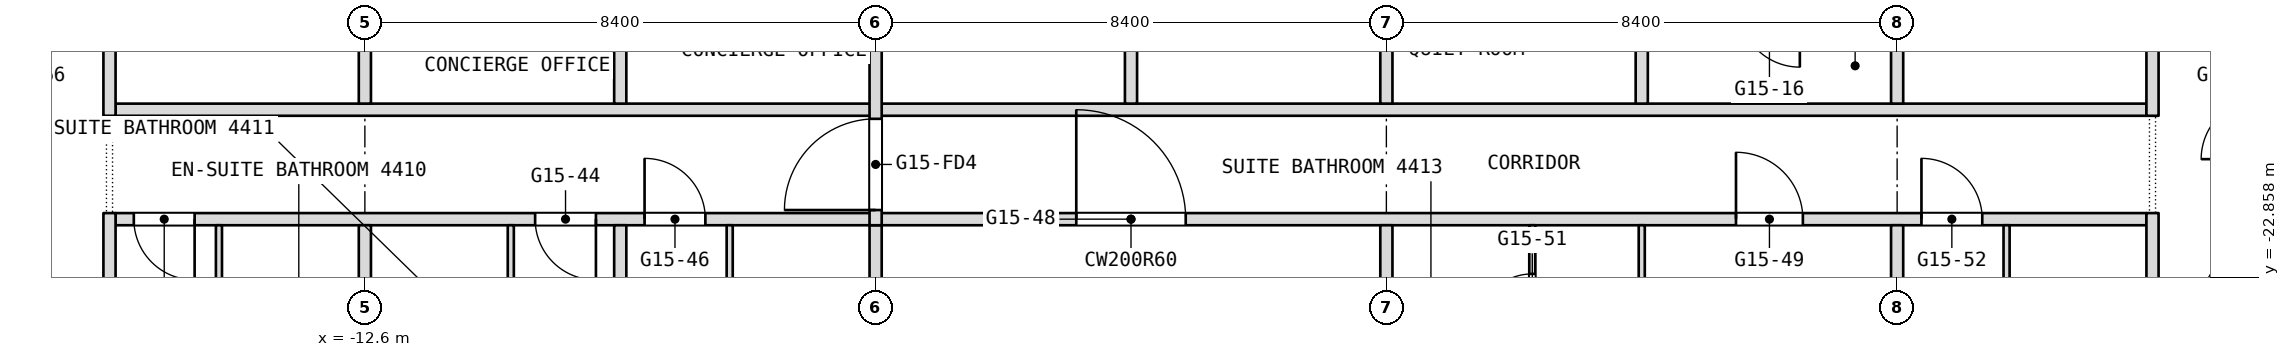
"""IFC4 building model, lengths in metres.
Left out: names, types, materials, properties, quantities, classifications, styles, units other than length and angle.
Written with IfcOpenShell. Run it as: python <this file> out.ifc"""

import sys

from ifc_helpers import new_model, si_unit, direction, frame, frame_2d, origin, place, context, subcontext, project, spatial, rectangle, extrude, element, fill, save


model = new_model("IFC4")
c1 = context("Model", 3, precision=1e-05, world=origin(), true_north=direction((0.0, 1.0)))
c2 = subcontext(c1, "Body", "Model", "MODEL_VIEW")
j1 = project(units=[si_unit("LENGTHUNIT", "METRE"), si_unit("PLANEANGLEUNIT", "RADIAN")], contexts=[c1])
p1 = place(None, origin())
s1 = spatial("IfcSite", under=j1, at=p1, CompositionType="ELEMENT")
p2 = place(p1, origin())
s2 = spatial("IfcBuilding", under=s1, at=p2, CompositionType="ELEMENT")
p3 = place(p2, frame((0.0, 0.0, 194.9)))
s3 = spatial("IfcBuildingStorey", under=s2, at=p3, CompositionType="ELEMENT", Elevation=194.9)
p4 = place(p3, frame((-16.7, -21.9, 0.0), z_axis=(0.0, 0.0, 1.0), x_axis=(1.0, 0.0, 0.0)))
e1 = element("IfcWall", 1, at=p4, inside=s3, PredefinedType="PARTITIONING", context=c2, shape_type="SweptSolid", body=[
    extrude(rectangle(XDim=33.4, YDim=0.2, at=frame_2d((16.7, 0.0))), origin(), (0.0, 0.0, 1.0), 3.34),
])
p5 = place(p4, frame((0.3, 0.0, 0.0)))
e2 = element("IfcOpeningElement", 2, at=p5, cuts=e1, PredefinedType="OPENING", context=c2, shape_type="SweptSolid", body=[
    extrude(rectangle(XDim=1.0, YDim=2.1, at=frame_2d((0.5, 1.05))), frame((0.0, 0.1, 0.0), z_axis=(0.0, -1.0, 0.0), x_axis=(1.0, 0.0, 0.0)), (0.0, 0.0, 1.0), 0.2),
])
p6 = place(p4, frame((6.9, 0.0, 0.0)))
e3 = element("IfcOpeningElement", 3, at=p6, cuts=e1, PredefinedType="OPENING", context=c2, shape_type="SweptSolid", body=[
    extrude(rectangle(XDim=1.0, YDim=2.1, at=frame_2d((0.5, 1.05))), frame((0.0, 0.1, 0.0), z_axis=(0.0, -1.0, 0.0), x_axis=(1.0, 0.0, 0.0)), (0.0, 0.0, 1.0), 0.2),
])
p7 = place(p4, frame((8.7, 0.0, 0.0)))
e4 = element("IfcOpeningElement", 4, at=p7, cuts=e1, PredefinedType="OPENING", context=c2, shape_type="SweptSolid", body=[
    extrude(rectangle(XDim=1.0, YDim=2.1, at=frame_2d((0.5, 1.05))), frame((0.0, 0.1, 0.0), z_axis=(0.0, -1.0, 0.0), x_axis=(1.0, 0.0, 0.0)), (0.0, 0.0, 1.0), 0.2),
])
p8 = place(p4, frame((15.8, 0.0, 0.0)))
e5 = element("IfcOpeningElement", 5, at=p8, cuts=e1, PredefinedType="OPENING", context=c2, shape_type="SweptSolid", body=[
    extrude(rectangle(XDim=1.8, YDim=2.1, at=frame_2d((0.9, 1.05))), frame((0.0, 0.1, 0.0), z_axis=(0.0, -1.0, 0.0), x_axis=(1.0, 0.0, 0.0)), (0.0, 0.0, 1.0), 0.2),
])
p9 = place(p4, frame((26.65, 0.0, 0.0)))
e6 = element("IfcOpeningElement", 6, at=p9, cuts=e1, PredefinedType="OPENING", context=c2, shape_type="SweptSolid", body=[
    extrude(rectangle(XDim=1.1, YDim=2.1, at=frame_2d((0.55, 1.05))), frame((0.0, 0.1, 0.0), z_axis=(0.0, -1.0, 0.0), x_axis=(1.0, 0.0, 0.0)), (0.0, 0.0, 1.0), 0.2),
])
p10 = place(p4, frame((29.7, 0.0, 0.0)))
e7 = element("IfcOpeningElement", 7, at=p10, cuts=e1, PredefinedType="OPENING", context=c2, shape_type="SweptSolid", body=[
    extrude(rectangle(XDim=1.0, YDim=2.1, at=frame_2d((0.5, 1.05))), frame((0.0, 0.1, 0.0), z_axis=(0.0, -1.0, 0.0), x_axis=(1.0, 0.0, 0.0)), (0.0, 0.0, 1.0), 0.2),
])
p11 = place(p3, frame((-16.7, -20.1, 0.0), z_axis=(0.0, 0.0, 1.0), x_axis=(1.0, 0.0, 0.0)))
e8 = element("IfcWall", 8, at=p11, inside=s3, PredefinedType="PARTITIONING", context=c2, shape_type="SweptSolid", body=[
    extrude(rectangle(XDim=33.4, YDim=0.2, at=frame_2d((16.7, 0.0))), origin(), (0.0, 0.0, 1.0), 3.34),
])
p12 = place(p3, frame((16.8, -27.229, 0.0), z_axis=(0.0, 0.0, 1.0), x_axis=(0.0, 1.0, 0.0)))
e9 = element("IfcWall", 9, at=p12, inside=s3, PredefinedType="PARTITIONING", context=c2, shape_type="SweptSolid", body=[
    extrude(rectangle(XDim=5.429, YDim=0.2, at=frame_2d((2.714, 0.0))), origin(), (0.0, 0.0, 1.0), 3.34),
])
p13 = place(p3, frame((16.8, -20.2, 0.0), z_axis=(0.0, 0.0, 1.0), x_axis=(0.0, 1.0, 0.0)))
e10 = element("IfcWall", 10, at=p13, inside=s3, PredefinedType="PARTITIONING", context=c2, shape_type="SweptSolid", body=[
    extrude(rectangle(XDim=6.8, YDim=0.2, at=frame_2d((3.4, 0.0))), origin(), (0.0, 0.0, 1.0), 3.34),
])
p14 = place(p3, frame((14.4, -25.85, 0.0), z_axis=(0.0, 0.0, 1.0), x_axis=(0.0, 1.0, 0.0)))
e11 = element("IfcWall", 11, at=p14, inside=s3, PredefinedType="PARTITIONING", context=c2, shape_type="SweptSolid", body=[
    extrude(rectangle(XDim=3.85, YDim=0.1, at=frame_2d((1.925, 0.0))), origin(), (0.0, 0.0, 1.0), 3.34),
])
p15 = place(p3, frame((12.6, -28.343, 0.0), z_axis=(0.0, 0.0, 1.0), x_axis=(0.0, 1.0, 0.0)))
e12 = element("IfcWall", 12, at=p15, inside=s3, PredefinedType="PARTITIONING", context=c2, shape_type="SweptSolid", body=[
    extrude(rectangle(XDim=6.343, YDim=0.2, at=frame_2d((3.171, 0.0))), origin(), (0.0, 0.0, 1.0), 3.34),
])
p16 = place(p3, frame((12.6, -20.0, 0.0), z_axis=(0.0, 0.0, 1.0), x_axis=(0.0, 1.0, 0.0)))
e13 = element("IfcWall", 13, at=p16, inside=s3, PredefinedType="PARTITIONING", context=c2, shape_type="SweptSolid", body=[
    extrude(rectangle(XDim=1.5, YDim=0.2, at=frame_2d((0.75, 0.0))), origin(), (0.0, 0.0, 1.0), 3.34),
])
p17 = place(p3, frame((8.4, -28.9, 0.0), z_axis=(0.0, 0.0, 1.0), x_axis=(0.0, 1.0, 0.0)))
e14 = element("IfcWall", 14, at=p17, inside=s3, PredefinedType="PARTITIONING", context=c2, shape_type="SweptSolid", body=[
    extrude(rectangle(XDim=6.9, YDim=0.1, at=frame_2d((3.45, 0.0))), origin(), (0.0, 0.0, 1.0), 3.34),
])
p18 = place(p17, frame((2.53, 0.0, 0.0)))
e15 = element("IfcOpeningElement", 15, at=p18, cuts=e14, PredefinedType="OPENING", context=c2, shape_type="SweptSolid", body=[
    extrude(rectangle(XDim=0.9, YDim=2.1, at=frame_2d((0.45, 1.05))), frame((0.0, 0.05, 0.0), z_axis=(0.0, -1.0, 0.0), x_axis=(1.0, 0.0, 0.0)), (0.0, 0.0, 1.0), 0.1),
])
p19 = place(p3, frame((8.4, -20.0, 0.0), z_axis=(0.0, 0.0, 1.0), x_axis=(0.0, 1.0, 0.0)))
e16 = element("IfcWall", 16, at=p19, inside=s3, PredefinedType="PARTITIONING", context=c2, shape_type="SweptSolid", body=[
    extrude(rectangle(XDim=1.5, YDim=0.2, at=frame_2d((0.75, 0.0))), origin(), (0.0, 0.0, 1.0), 3.34),
])
p20 = place(p3, frame((6.6, -24.55, 0.0), z_axis=(0.0, 0.0, 1.0), x_axis=(0.0, 1.0, 0.0)))
e17 = element("IfcWall", 17, at=p20, inside=s3, PredefinedType="PARTITIONING", context=c2, shape_type="SweptSolid", body=[
    extrude(rectangle(XDim=2.55, YDim=0.1, at=frame_2d((1.275, 0.0))), origin(), (0.0, 0.0, 1.0), 3.34),
])
p21 = place(p20, frame((0.85, 0.0, 0.0)))
e18 = element("IfcOpeningElement", 18, at=p21, cuts=e17, PredefinedType="OPENING", context=c2, shape_type="SweptSolid", body=[
    extrude(rectangle(XDim=0.9, YDim=2.1, at=frame_2d((0.45, 1.05))), frame((0.0, 0.05, 0.0), z_axis=(0.0, -1.0, 0.0), x_axis=(1.0, 0.0, 0.0)), (0.0, 0.0, 1.0), 0.1),
])
p22 = place(p3, frame((4.2, -28.9, 0.0), z_axis=(0.0, 0.0, 1.0), x_axis=(0.0, 1.0, 0.0)))
e19 = element("IfcWall", 19, at=p22, inside=s3, PredefinedType="PARTITIONING", context=c2, shape_type="SweptSolid", body=[
    extrude(rectangle(XDim=6.9, YDim=0.2, at=frame_2d((3.45, 0.0))), origin(), (0.0, 0.0, 1.0), 3.34),
])
for number, where, z_axis, x_axis in (
    (20, (4.2, -20.0, 0.0), (0.0, 0.0, 1.0), (0.0, 1.0, 0.0)),
    (21, (0.0, -20.0, 0.0), (0.0, 0.0, 1.0), (0.0, 1.0, 0.0)),
):
    element("IfcWall", number, at=place(p3, frame(where, z_axis=z_axis, x_axis=x_axis)), inside=s3, PredefinedType="PARTITIONING", context=c2, shape_type="SweptSolid", body=[
        extrude(rectangle(XDim=6.4, YDim=0.2, at=frame_2d((3.2, 0.0))), origin(), (0.0, 0.0, 1.0), 3.34),
    ])
p23 = place(p3, frame((-4.2, -28.9, 0.0), z_axis=(0.0, 0.0, 1.0), x_axis=(0.0, 1.0, 0.0)))
e22 = element("IfcWall", 22, at=p23, inside=s3, PredefinedType="PARTITIONING", context=c2, shape_type="SweptSolid", body=[
    extrude(rectangle(XDim=6.9, YDim=0.2, at=frame_2d((3.45, 0.0))), origin(), (0.0, 0.0, 1.0), 3.34),
])
p24 = place(p3, frame((-4.2, -22.0, 0.0), z_axis=(0.0, 0.0, 1.0), x_axis=(0.0, 1.0, 0.0)))
e23 = element("IfcWall", 23, at=p24, inside=s3, PredefinedType="PARTITIONING", context=c2, shape_type="SweptSolid", body=[
    extrude(rectangle(XDim=8.4, YDim=0.2, at=frame_2d((4.2, 0.0))), origin(), (0.0, 0.0, 1.0), 3.34),
])
p25 = place(p24, frame((0.25, 0.0, 0.0)))
e24 = element("IfcOpeningElement", 24, at=p25, cuts=e23, PredefinedType="OPENING", context=c2, shape_type="SweptSolid", body=[
    extrude(rectangle(XDim=1.5, YDim=2.1, at=frame_2d((0.75, 1.05))), frame((0.0, 0.1, 0.0), z_axis=(0.0, -1.0, 0.0), x_axis=(1.0, 0.0, 0.0)), (0.0, 0.0, 1.0), 0.2),
])
p26 = place(p3, frame((-6.6, -25.85, 0.0), z_axis=(0.0, 0.0, 1.0), x_axis=(0.0, 1.0, 0.0)))
e25 = element("IfcWall", 25, at=p26, inside=s3, PredefinedType="PARTITIONING", context=c2, shape_type="SweptSolid", body=[
    extrude(rectangle(XDim=3.85, YDim=0.1, at=frame_2d((1.925, 0.0))), origin(), (0.0, 0.0, 1.0), 3.34),
])
p27 = place(p3, frame((-8.4, -28.9, 0.0), z_axis=(0.0, 0.0, 1.0), x_axis=(0.0, 1.0, 0.0)))
e26 = element("IfcWall", 26, at=p27, inside=s3, PredefinedType="PARTITIONING", context=c2, shape_type="SweptSolid", body=[
    extrude(rectangle(XDim=6.9, YDim=0.2, at=frame_2d((3.45, 0.0))), origin(), (0.0, 0.0, 1.0), 3.34),
])
p28 = place(p3, frame((-8.4, -20.0, 0.0), z_axis=(0.0, 0.0, 1.0), x_axis=(0.0, 1.0, 0.0)))
e27 = element("IfcWall", 27, at=p28, inside=s3, PredefinedType="PARTITIONING", context=c2, shape_type="SweptSolid", body=[
    extrude(rectangle(XDim=1.5, YDim=0.2, at=frame_2d((0.75, 0.0))), origin(), (0.0, 0.0, 1.0), 3.34),
])
p29 = place(p3, frame((-10.2, -25.25, 0.0), z_axis=(0.0, 0.0, 1.0), x_axis=(0.0, 1.0, 0.0)))
e28 = element("IfcWall", 28, at=p29, inside=s3, PredefinedType="PARTITIONING", context=c2, shape_type="SweptSolid", body=[
    extrude(rectangle(XDim=3.25, YDim=0.1, at=frame_2d((1.625, 0.0))), origin(), (0.0, 0.0, 1.0), 3.34),
])
p30 = place(p3, frame((-12.6, -28.343, 0.0), z_axis=(0.0, 0.0, 1.0), x_axis=(0.0, 1.0, 0.0)))
e29 = element("IfcWall", 29, at=p30, inside=s3, PredefinedType="PARTITIONING", context=c2, shape_type="SweptSolid", body=[
    extrude(rectangle(XDim=6.343, YDim=0.2, at=frame_2d((3.171, 0.0))), origin(), (0.0, 0.0, 1.0), 3.34),
])
p31 = place(p3, frame((-12.6, -20.0, 0.0), z_axis=(0.0, 0.0, 1.0), x_axis=(0.0, 1.0, 0.0)))
e30 = element("IfcWall", 30, at=p31, inside=s3, PredefinedType="PARTITIONING", context=c2, shape_type="SweptSolid", body=[
    extrude(rectangle(XDim=1.5, YDim=0.2, at=frame_2d((0.75, 0.0))), origin(), (0.0, 0.0, 1.0), 3.34),
])
p32 = place(p3, frame((-15.0, -24.95, 0.0), z_axis=(0.0, 0.0, 1.0), x_axis=(0.0, 1.0, 0.0)))
e31 = element("IfcWall", 31, at=p32, inside=s3, PredefinedType="PARTITIONING", context=c2, shape_type="SweptSolid", body=[
    extrude(rectangle(XDim=2.95, YDim=0.1, at=frame_2d((1.475, 0.0))), origin(), (0.0, 0.0, 1.0), 3.34),
])
p33 = place(p3, frame((-16.8, -27.229, 0.0), z_axis=(0.0, 0.0, 1.0), x_axis=(0.0, 1.0, 0.0)))
e32 = element("IfcWall", 32, at=p33, inside=s3, PredefinedType="PARTITIONING", context=c2, shape_type="SweptSolid", body=[
    extrude(rectangle(XDim=5.429, YDim=0.2, at=frame_2d((2.714, 0.0))), origin(), (0.0, 0.0, 1.0), 3.34),
])
p34 = place(p3, frame((-16.8, -20.2, 0.0), z_axis=(0.0, 0.0, 1.0), x_axis=(0.0, 1.0, 0.0)))
e33 = element("IfcWall", 33, at=p34, inside=s3, PredefinedType="PARTITIONING", context=c2, shape_type="SweptSolid", body=[
    extrude(rectangle(XDim=6.8, YDim=0.2, at=frame_2d((3.4, 0.0))), origin(), (0.0, 0.0, 1.0), 3.34),
])
p35 = place(p5, origin())
e34 = element("IfcDoor", 34, at=p35, inside=s3, OperationType="SINGLE_SWING_RIGHT", PredefinedType="DOOR", context=c2, shape_type="SweptSolid", body=[
    extrude(rectangle(XDim=1.0, YDim=2.1, at=frame_2d((0.5, 1.05))), frame((0.0, 0.025, 0.0), z_axis=(0.0, -1.0, 0.0), x_axis=(1.0, 0.0, 0.0)), (0.0, 0.0, 1.0), 0.05),
])
fill(e2, e34)
p36 = place(p6, origin())
e35 = element("IfcDoor", 35, at=p36, inside=s3, OperationType="SINGLE_SWING_RIGHT", PredefinedType="DOOR", context=c2, shape_type="SweptSolid", body=[
    extrude(rectangle(XDim=1.0, YDim=2.1, at=frame_2d((0.5, 1.05))), frame((0.0, 0.025, 0.0), z_axis=(0.0, -1.0, 0.0), x_axis=(1.0, 0.0, 0.0)), (0.0, 0.0, 1.0), 0.05),
])
fill(e3, e35)
p37 = place(p7, origin())
e36 = element("IfcDoor", 36, at=p37, inside=s3, OperationType="SINGLE_SWING_RIGHT", PredefinedType="DOOR", context=c2, shape_type="SweptSolid", body=[
    extrude(rectangle(XDim=1.0, YDim=2.1, at=frame_2d((0.5, 1.05))), frame((0.0, 0.025, 0.0), z_axis=(0.0, -1.0, 0.0), x_axis=(1.0, 0.0, 0.0)), (0.0, 0.0, 1.0), 0.05),
])
fill(e4, e36)
p38 = place(p8, origin())
e37 = element("IfcDoor", 37, at=p38, inside=s3, OperationType="DOUBLE_DOOR_SINGLE_SWING", PredefinedType="DOOR", context=c2, shape_type="SweptSolid", body=[
    extrude(rectangle(XDim=1.8, YDim=2.1, at=frame_2d((0.9, 1.05))), frame((0.0, 0.025, 0.0), z_axis=(0.0, -1.0, 0.0), x_axis=(1.0, 0.0, 0.0)), (0.0, 0.0, 1.0), 0.05),
])
fill(e5, e37)
p39 = place(p9, origin())
e38 = element("IfcDoor", 38, at=p39, inside=s3, OperationType="SINGLE_SWING_LEFT", PredefinedType="DOOR", context=c2, shape_type="SweptSolid", body=[
    extrude(rectangle(XDim=1.1, YDim=2.1, at=frame_2d((0.55, 1.05))), frame((0.0, 0.025, 0.0), z_axis=(0.0, -1.0, 0.0), x_axis=(1.0, 0.0, 0.0)), (0.0, 0.0, 1.0), 0.05),
])
fill(e6, e38)
p40 = place(p10, origin())
e39 = element("IfcDoor", 39, at=p40, inside=s3, OperationType="SINGLE_SWING_RIGHT", PredefinedType="DOOR", context=c2, shape_type="SweptSolid", body=[
    extrude(rectangle(XDim=1.0, YDim=2.1, at=frame_2d((0.5, 1.05))), frame((0.0, 0.025, 0.0), z_axis=(0.0, -1.0, 0.0), x_axis=(1.0, 0.0, 0.0)), (0.0, 0.0, 1.0), 0.05),
])
fill(e7, e39)
p41 = place(p21, origin())
e40 = element("IfcDoor", 40, at=p41, inside=s3, OperationType="SINGLE_SWING_RIGHT", PredefinedType="DOOR", context=c2, shape_type="SweptSolid", body=[
    extrude(rectangle(XDim=0.9, YDim=2.1, at=frame_2d((0.45, 1.05))), frame((0.0, 0.025, 0.0), z_axis=(0.0, -1.0, 0.0), x_axis=(1.0, 0.0, 0.0)), (0.0, 0.0, 1.0), 0.05),
])
fill(e18, e40)
p42 = place(p25, origin())
e41 = element("IfcDoor", 41, at=p42, inside=s3, OperationType="DOUBLE_DOOR_DOUBLE_SWING", PredefinedType="DOOR", context=c2, shape_type="SweptSolid", body=[
    extrude(rectangle(XDim=1.5, YDim=2.1, at=frame_2d((0.75, 1.05))), frame((0.0, 0.025, 0.0), z_axis=(0.0, -1.0, 0.0), x_axis=(1.0, 0.0, 0.0)), (0.0, 0.0, 1.0), 0.05),
])
fill(e24, e41)
save(model, sys.argv[1])
